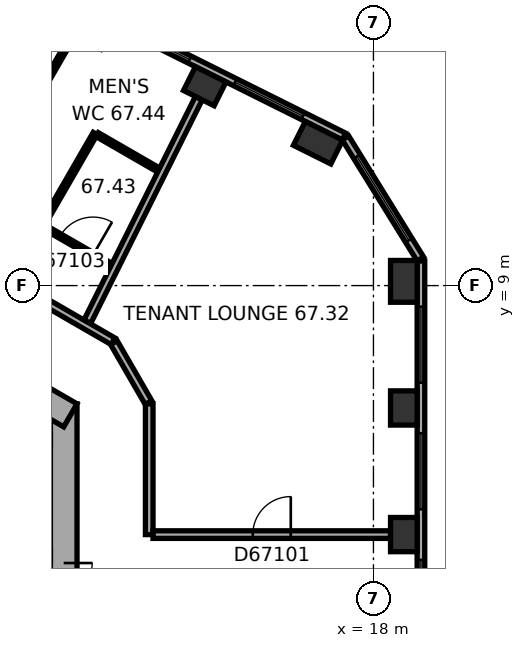
"""IFC4 building model, lengths in metres.
Left out: names, types, materials, properties, quantities, classifications, styles, units other than length and angle.
Written with IfcOpenShell. Run it as: python <this file> out.ifc"""

import sys

from ifc_helpers import new_model, si_unit, direction, frame, frame_2d, origin, origin_2d, place, context, subcontext, project, spatial, rectangle, extrude, element, fill, save


model = new_model("IFC4")
c1 = context("Model", 3, precision=1e-05, world=origin(), true_north=direction((0.0, 1.0)))
c2 = subcontext(c1, "Body", "Model", "MODEL_VIEW")
j1 = project(units=[si_unit("LENGTHUNIT", "METRE"), si_unit("PLANEANGLEUNIT", "RADIAN")], contexts=[c1])
p1 = place(None, origin())
s1 = spatial("IfcSite", under=j1, at=p1, CompositionType="ELEMENT")
p2 = place(p1, origin())
s2 = spatial("IfcBuilding", under=s1, at=p2, CompositionType="ELEMENT")
p3 = place(p2, frame((0.0, 0.0, 270.9)))
s3 = spatial("IfcBuildingStorey", under=s2, at=p3, CompositionType="ELEMENT", Elevation=270.9)
for number, where, z_axis, x_axis in (
    (1, (18.8, 2.448, 0.0), (0.0, 0.0, 1.0), (0.0, 1.0, 0.0)),
    (2, (18.8, 5.78, 0.0), (0.0, 0.0, 1.0), (0.0, 1.0, 0.0)),
):
    element("IfcColumn", number, at=place(p3, frame(where, z_axis=z_axis, x_axis=x_axis)), inside=s3, PredefinedType="COLUMN", context=c2, shape_type="SweptSolid", body=[
        extrude(rectangle(XDim=0.9, YDim=0.7, at=origin_2d()), origin(), (0.0, 0.0, 1.0), 3.7),
    ])
for number, where, z_axis, x_axis in (
    (3, (18.8, 9.112, 0.0), (0.0, 0.0, 1.0), (0.0, 1.0, 0.0)),
    (4, (16.543, 12.759, 0.0), (0.0, 0.0, 1.0), (-0.895, 0.446, 0.0)),
):
    element("IfcColumn", number, at=place(p3, frame(where, z_axis=z_axis, x_axis=x_axis)), inside=s3, PredefinedType="COLUMN", context=c2, shape_type="SweptSolid", body=[
        extrude(rectangle(XDim=1.1, YDim=0.7, at=origin_2d()), origin(), (0.0, 0.0, 1.0), 3.7),
    ])
p4 = place(p3, frame((13.561, 14.246, 0.0), z_axis=(0.0, 0.0, 1.0), x_axis=(-0.894934361602, 0.44619781311, 0.0)))
e5 = element("IfcColumn", 5, at=p4, inside=s3, PredefinedType="COLUMN", context=c2, shape_type="SweptSolid", body=[
    extrude(rectangle(XDim=0.9, YDim=0.7, at=origin_2d()), origin(), (0.0, 0.0, 1.0), 3.7),
])
p5 = place(p3, frame((9.85, -5.889, 0.0), z_axis=(0.0, 0.0, 1.0), x_axis=(0.0, 1.0, 0.0)))
e6 = element("IfcWall", 6, at=p5, inside=s3, PredefinedType="SHEAR", context=c2, shape_type="SweptSolid", body=[
    extrude(rectangle(XDim=11.778, YDim=0.7, at=frame_2d((5.889, 0.0))), origin(), (0.0, 0.0, 1.0), 3.7),
])
p6 = place(p5, frame((6.089, 0.0, 0.0)))
e7 = element("IfcOpeningElement", 7, at=p6, cuts=e6, PredefinedType="OPENING", context=c2, shape_type="SweptSolid", body=[
    extrude(rectangle(XDim=1.5, YDim=2.1, at=frame_2d((0.75, 1.05))), frame((0.0, 0.36, 0.0), z_axis=(0.0, -1.0, 0.0), x_axis=(1.0, 0.0, 0.0)), (0.0, 0.0, 1.0), 0.72),
])
p7 = place(p5, frame((1.639, 0.0, 0.0)))
e8 = element("IfcOpeningElement", 8, at=p7, cuts=e6, PredefinedType="OPENING", context=c2, shape_type="SweptSolid", body=[
    extrude(rectangle(XDim=0.9, YDim=2.1, at=frame_2d((0.45, 1.05))), frame((0.0, 0.36, 0.0), z_axis=(0.0, -1.0, 0.0), x_axis=(1.0, 0.0, 0.0)), (0.0, 0.0, 1.0), 0.72),
])
p8 = place(p5, frame((4.239, 0.0, 0.0)))
e9 = element("IfcOpeningElement", 9, at=p8, cuts=e6, PredefinedType="OPENING", context=c2, shape_type="SweptSolid", body=[
    extrude(rectangle(XDim=0.9, YDim=2.1, at=frame_2d((0.45, 1.05))), frame((0.0, 0.36, 0.0), z_axis=(0.0, -1.0, 0.0), x_axis=(1.0, 0.0, 0.0)), (0.0, 0.0, 1.0), 0.72),
])
p9 = place(p3, frame((10.025, 5.586, 0.0), z_axis=(0.0, 0.0, 1.0), x_axis=(-0.866026453023, 0.499998182661, 0.0)))
e10 = element("IfcWall", 10, at=p9, inside=s3, PredefinedType="SHEAR", context=c2, shape_type="SweptSolid", body=[
    extrude(rectangle(XDim=11.778, YDim=0.7, at=frame_2d((5.889, 0.0))), origin(), (0.0, 0.0, 1.0), 3.7),
])
p10 = place(p9, frame((5.139, 0.0, 0.0)))
e11 = element("IfcOpeningElement", 11, at=p10, cuts=e10, PredefinedType="OPENING", context=c2, shape_type="SweptSolid", body=[
    extrude(rectangle(XDim=0.9, YDim=2.1, at=frame_2d((0.45, 1.05))), frame((0.0, 0.36, 0.0), z_axis=(0.0, -1.0, 0.0), x_axis=(1.0, 0.0, 0.0)), (0.0, 0.0, 1.0), 0.72),
])
p11 = place(p3, frame((19.25, -8.084, 0.0), z_axis=(0.0, 0.0, 1.0), x_axis=(0.0, 1.0, 0.0)))
e12 = element("IfcWall", 12, at=p11, inside=s3, PredefinedType="STANDARD", context=c2, shape_type="SweptSolid", body=[
    extrude(rectangle(XDim=17.731, YDim=0.2, at=frame_2d((8.866, 0.0))), origin(), (0.0, 0.0, 1.0), 3.7),
])
p12 = place(p11, frame((1.203, 0.0, 0.9)))
e13 = element("IfcOpeningElement", 13, at=p12, cuts=e12, PredefinedType="OPENING", context=c2, shape_type="SweptSolid", body=[
    extrude(rectangle(XDim=2.0, YDim=2.0, at=frame_2d((1.0, 1.0))), frame((0.0, 0.11, 0.0), z_axis=(0.0, -1.0, 0.0), x_axis=(1.0, 0.0, 0.0)), (0.0, 0.0, 1.0), 0.22),
])
p13 = place(p11, frame((4.535, 0.0, 0.9)))
e14 = element("IfcOpeningElement", 14, at=p13, cuts=e12, PredefinedType="OPENING", context=c2, shape_type="SweptSolid", body=[
    extrude(rectangle(XDim=2.0, YDim=2.0, at=frame_2d((1.0, 1.0))), frame((0.0, 0.11, 0.0), z_axis=(0.0, -1.0, 0.0), x_axis=(1.0, 0.0, 0.0)), (0.0, 0.0, 1.0), 0.22),
])
p14 = place(p11, frame((7.866, 0.0, 0.9)))
e15 = element("IfcOpeningElement", 15, at=p14, cuts=e12, PredefinedType="OPENING", context=c2, shape_type="SweptSolid", body=[
    extrude(rectangle(XDim=2.0, YDim=2.0, at=frame_2d((1.0, 1.0))), frame((0.0, 0.11, 0.0), z_axis=(0.0, -1.0, 0.0), x_axis=(1.0, 0.0, 0.0)), (0.0, 0.0, 1.0), 0.22),
])
p15 = place(p11, frame((11.198, 0.0, 0.9)))
e16 = element("IfcOpeningElement", 16, at=p15, cuts=e12, PredefinedType="OPENING", context=c2, shape_type="SweptSolid", body=[
    extrude(rectangle(XDim=2.0, YDim=2.0, at=frame_2d((1.0, 1.0))), frame((0.0, 0.11, 0.0), z_axis=(0.0, -1.0, 0.0), x_axis=(1.0, 0.0, 0.0)), (0.0, 0.0, 1.0), 0.22),
])
p16 = place(p11, frame((14.53, 0.0, 0.9)))
e17 = element("IfcOpeningElement", 17, at=p16, cuts=e12, PredefinedType="OPENING", context=c2, shape_type="SweptSolid", body=[
    extrude(rectangle(XDim=2.0, YDim=2.0, at=frame_2d((1.0, 1.0))), frame((0.0, 0.11, 0.0), z_axis=(0.0, -1.0, 0.0), x_axis=(1.0, 0.0, 0.0)), (0.0, 0.0, 1.0), 0.22),
])
p17 = place(p3, frame((19.235, 9.7, 0.0), z_axis=(0.0, 0.0, 1.0), x_axis=(-0.526233475464, 0.850340125656, 0.0)))
e18 = element("IfcWall", 18, at=p17, inside=s3, PredefinedType="STANDARD", context=c2, shape_type="SweptSolid", body=[
    extrude(rectangle(XDim=3.747, YDim=0.2, at=frame_2d((1.874, 0.0))), origin(), (0.0, 0.0, 1.0), 3.7),
])
p18 = place(p17, frame((0.573, 0.0, 0.9)))
e19 = element("IfcOpeningElement", 19, at=p18, cuts=e18, PredefinedType="OPENING", context=c2, shape_type="SweptSolid", body=[
    extrude(rectangle(XDim=2.6, YDim=2.0, at=frame_2d((1.3, 1.0))), frame((0.0, 0.11, 0.0), z_axis=(0.0, -1.0, 0.0), x_axis=(1.0, 0.0, 0.0)), (0.0, 0.0, 1.0), 0.22),
])
p19 = place(p3, frame((17.223, 12.923, 0.0), z_axis=(0.0, 0.0, 1.0), x_axis=(-0.894930561148, 0.44620543556, 0.0)))
e20 = element("IfcWall", 20, at=p19, inside=s3, PredefinedType="STANDARD", context=c2, shape_type="SweptSolid", body=[
    extrude(rectangle(XDim=17.731, YDim=0.2, at=frame_2d((8.866, 0.0))), origin(), (0.0, 0.0, 1.0), 3.7),
])
p20 = place(p19, frame((1.202, 0.0, 0.9)))
e21 = element("IfcOpeningElement", 21, at=p20, cuts=e20, PredefinedType="OPENING", context=c2, shape_type="SweptSolid", body=[
    extrude(rectangle(XDim=2.0, YDim=2.0, at=frame_2d((1.0, 1.0))), frame((0.0, 0.11, 0.0), z_axis=(0.0, -1.0, 0.0), x_axis=(1.0, 0.0, 0.0)), (0.0, 0.0, 1.0), 0.22),
])
p21 = place(p19, frame((4.533, 0.0, 0.9)))
e22 = element("IfcOpeningElement", 22, at=p21, cuts=e20, PredefinedType="OPENING", context=c2, shape_type="SweptSolid", body=[
    extrude(rectangle(XDim=2.0, YDim=2.0, at=frame_2d((1.0, 1.0))), frame((0.0, 0.11, 0.0), z_axis=(0.0, -1.0, 0.0), x_axis=(1.0, 0.0, 0.0)), (0.0, 0.0, 1.0), 0.22),
])
p22 = place(p19, frame((7.865, 0.0, 0.9)))
e23 = element("IfcOpeningElement", 23, at=p22, cuts=e20, PredefinedType="OPENING", context=c2, shape_type="SweptSolid", body=[
    extrude(rectangle(XDim=2.0, YDim=2.0, at=frame_2d((1.0, 1.0))), frame((0.0, 0.11, 0.0), z_axis=(0.0, -1.0, 0.0), x_axis=(1.0, 0.0, 0.0)), (0.0, 0.0, 1.0), 0.22),
])
p23 = place(p19, frame((11.197, 0.0, 0.9)))
e24 = element("IfcOpeningElement", 24, at=p23, cuts=e20, PredefinedType="OPENING", context=c2, shape_type="SweptSolid", body=[
    extrude(rectangle(XDim=2.0, YDim=2.0, at=frame_2d((1.0, 1.0))), frame((0.0, 0.11, 0.0), z_axis=(0.0, -1.0, 0.0), x_axis=(1.0, 0.0, 0.0)), (0.0, 0.0, 1.0), 0.22),
])
p24 = place(p19, frame((14.528, 0.0, 0.9)))
e25 = element("IfcOpeningElement", 25, at=p24, cuts=e20, PredefinedType="OPENING", context=c2, shape_type="SweptSolid", body=[
    extrude(rectangle(XDim=2.0, YDim=2.0, at=frame_2d((1.0, 1.0))), frame((0.0, 0.11, 0.0), z_axis=(0.0, -1.0, 0.0), x_axis=(1.0, 0.0, 0.0)), (0.0, 0.0, 1.0), 0.22),
])
p25 = place(p3, frame((10.091, 15.585, 0.0), z_axis=(0.0, 0.0, 1.0), x_axis=(-0.499969186147, -0.86604319344, 0.0)))
e26 = element("IfcWall", 26, at=p25, inside=s3, PredefinedType="PARTITIONING", context=c2, shape_type="SweptSolid", body=[
    extrude(rectangle(XDim=4.682, YDim=0.12, at=frame_2d((2.341, 0.0))), origin(), (0.0, 0.0, 1.0), 2.87),
])
p26 = place(p3, frame((10.679, 13.003, 0.0), z_axis=(0.0, 0.0, 1.0), x_axis=(-0.500048966069, -0.865997131366, 0.0)))
e27 = element("IfcWall", 27, at=p26, inside=s3, PredefinedType="PARTITIONING", context=c2, shape_type="SweptSolid", body=[
    extrude(rectangle(XDim=2.74, YDim=0.12, at=frame_2d((1.37, 0.0))), origin(), (0.0, 0.0, 1.0), 3.42),
])
p27 = place(p3, frame((11.097, 9.528, 0.0), z_axis=(0.0, 0.0, 1.0), x_axis=(-0.866039938485, 0.499974824316, 0.0)))
e28 = element("IfcWall", 28, at=p27, inside=s3, PredefinedType="PARTITIONING", context=c2, shape_type="SweptSolid", body=[
    extrude(rectangle(XDim=6.476, YDim=0.12, at=frame_2d((3.238, 0.0))), origin(), (0.0, 0.0, 1.0), 3.42),
])
p28 = place(p27, frame((0.55, 0.0, 0.0)))
e29 = element("IfcOpeningElement", 29, at=p28, cuts=e28, PredefinedType="OPENING", context=c2, shape_type="SweptSolid", body=[
    extrude(rectangle(XDim=1.0, YDim=2.1, at=frame_2d((0.5, 1.05))), frame((0.0, 0.07, 0.0), z_axis=(0.0, -1.0, 0.0), x_axis=(1.0, 0.0, 0.0)), (0.0, 0.0, 1.0), 0.14),
])
p29 = place(p27, frame((2.55, 0.0, 0.0)))
e30 = element("IfcOpeningElement", 30, at=p29, cuts=e28, PredefinedType="OPENING", context=c2, shape_type="SweptSolid", body=[
    extrude(rectangle(XDim=0.9, YDim=2.1, at=frame_2d((0.45, 1.05))), frame((0.0, 0.07, 0.0), z_axis=(0.0, -1.0, 0.0), x_axis=(1.0, 0.0, 0.0)), (0.0, 0.0, 1.0), 0.14),
])
p30 = place(p27, frame((4.738, 0.0, 0.0)))
e31 = element("IfcOpeningElement", 31, at=p30, cuts=e28, PredefinedType="OPENING", context=c2, shape_type="SweptSolid", body=[
    extrude(rectangle(XDim=0.9, YDim=2.1, at=frame_2d((0.45, 1.05))), frame((0.0, 0.07, 0.0), z_axis=(0.0, -1.0, 0.0), x_axis=(1.0, 0.0, 0.0)), (0.0, 0.0, 1.0), 0.14),
])
p31 = place(p3, frame((11.15, 7.534, 0.0), z_axis=(0.0, 0.0, 1.0), x_axis=(-0.866026603062, 0.499997922785, 0.0)))
e32 = element("IfcWall", 32, at=p31, inside=s3, PredefinedType="PARTITIONING", context=c2, shape_type="SweptSolid", body=[
    extrude(rectangle(XDim=11.738, YDim=0.2, at=frame_2d((5.869, 0.0))), origin(), (0.0, 0.0, 1.0), 3.42),
])
p32 = place(p31, frame((3.676, 0.0, 0.0)))
e33 = element("IfcOpeningElement", 33, at=p32, cuts=e32, PredefinedType="OPENING", context=c2, shape_type="SweptSolid", body=[
    extrude(rectangle(XDim=1.0, YDim=2.1, at=frame_2d((0.5, 1.05))), frame((0.0, 0.11, 0.0), z_axis=(0.0, -1.0, 0.0), x_axis=(1.0, 0.0, 0.0)), (0.0, 0.0, 1.0), 0.22),
])
p33 = place(p3, frame((12.08, 5.924, 0.0), z_axis=(0.0, 0.0, 1.0), x_axis=(-0.500004960326, 0.86602253992, 0.0)))
e34 = element("IfcWall", 34, at=p33, inside=s3, PredefinedType="PARTITIONING", context=c2, shape_type="SweptSolid", body=[
    extrude(rectangle(XDim=1.82, YDim=0.2, at=frame_2d((0.91, 0.0))), origin(), (0.0, 0.0, 1.0), 3.42),
])
p34 = place(p3, frame((12.1, 2.448, 0.0), z_axis=(0.0, 0.0, 1.0), x_axis=(0.0, 1.0, 0.0)))
e35 = element("IfcWall", 35, at=p34, inside=s3, PredefinedType="PARTITIONING", context=c2, shape_type="SweptSolid", body=[
    extrude(rectangle(XDim=3.441, YDim=0.2, at=frame_2d((1.72, 0.0))), origin(), (0.0, 0.0, 1.0), 3.42),
])
p35 = place(p3, frame((12.349, 12.038, 0.0), z_axis=(0.0, 0.0, 1.0), x_axis=(-0.866039825209, 0.499975020527, 0.0)))
e36 = element("IfcWall", 36, at=p35, inside=s3, PredefinedType="PARTITIONING", context=c2, shape_type="SweptSolid", body=[
    extrude(rectangle(XDim=1.869, YDim=0.12, at=frame_2d((0.934, 0.0))), origin(), (0.0, 0.0, 1.0), 3.42),
])
p36 = place(p3, frame((13.405, 13.933, 0.0), z_axis=(0.0, 0.0, 1.0), x_axis=(-0.446187838644, -0.894939334618, 0.0)))
e37 = element("IfcWall", 37, at=p36, inside=s3, PredefinedType="PARTITIONING", context=c2, shape_type="SweptSolid", body=[
    extrude(rectangle(XDim=6.571, YDim=0.2, at=frame_2d((3.286, 0.0))), origin(), (0.0, 0.0, 1.0), 3.42),
])
p37 = place(p3, frame((18.45, 2.448, 0.0), z_axis=(0.0, 0.0, 1.0), x_axis=(-1.0, 0.0, 0.0)))
e38 = element("IfcWall", 38, at=p37, inside=s3, PredefinedType="PARTITIONING", context=c2, shape_type="SweptSolid", body=[
    extrude(rectangle(XDim=6.25, YDim=0.2, at=frame_2d((3.125, 0.0))), origin(), (0.0, 0.0, 1.0), 3.42),
])
p38 = place(p37, frame((2.625, 0.0, 0.0)))
e39 = element("IfcOpeningElement", 39, at=p38, cuts=e38, PredefinedType="OPENING", context=c2, shape_type="SweptSolid", body=[
    extrude(rectangle(XDim=1.0, YDim=2.1, at=frame_2d((0.5, 1.05))), frame((0.0, 0.11, 0.0), z_axis=(0.0, -1.0, 0.0), x_axis=(1.0, 0.0, 0.0)), (0.0, 0.0, 1.0), 0.22),
])
p39 = place(p14, origin())
e40 = element("IfcWindow", 40, at=p39, inside=s3, PartitioningType="SINGLE_PANEL", PredefinedType="WINDOW", context=c2, shape_type="SweptSolid", body=[
    extrude(rectangle(XDim=2.0, YDim=2.0, at=frame_2d((1.0, 1.0))), frame((0.0, 0.03, 0.0), z_axis=(0.0, -1.0, 0.0), x_axis=(1.0, 0.0, 0.0)), (0.0, 0.0, 1.0), 0.06),
])
fill(e15, e40)
p40 = place(p15, origin())
e41 = element("IfcWindow", 41, at=p40, inside=s3, PartitioningType="SINGLE_PANEL", PredefinedType="WINDOW", context=c2, shape_type="SweptSolid", body=[
    extrude(rectangle(XDim=2.0, YDim=2.0, at=frame_2d((1.0, 1.0))), frame((0.0, 0.03, 0.0), z_axis=(0.0, -1.0, 0.0), x_axis=(1.0, 0.0, 0.0)), (0.0, 0.0, 1.0), 0.06),
])
fill(e16, e41)
p41 = place(p16, origin())
e42 = element("IfcWindow", 42, at=p41, inside=s3, PartitioningType="SINGLE_PANEL", PredefinedType="WINDOW", context=c2, shape_type="SweptSolid", body=[
    extrude(rectangle(XDim=2.0, YDim=2.0, at=frame_2d((1.0, 1.0))), frame((0.0, 0.03, 0.0), z_axis=(0.0, -1.0, 0.0), x_axis=(1.0, 0.0, 0.0)), (0.0, 0.0, 1.0), 0.06),
])
fill(e17, e42)
p42 = place(p18, origin())
e43 = element("IfcWindow", 43, at=p42, inside=s3, PartitioningType="SINGLE_PANEL", PredefinedType="WINDOW", context=c2, shape_type="SweptSolid", body=[
    extrude(rectangle(XDim=2.6, YDim=2.0, at=frame_2d((1.3, 1.0))), frame((0.0, 0.03, 0.0), z_axis=(0.0, -1.0, 0.0), x_axis=(1.0, 0.0, 0.0)), (0.0, 0.0, 1.0), 0.06),
])
fill(e19, e43)
p43 = place(p20, origin())
e44 = element("IfcWindow", 44, at=p43, inside=s3, PartitioningType="SINGLE_PANEL", PredefinedType="WINDOW", context=c2, shape_type="SweptSolid", body=[
    extrude(rectangle(XDim=2.0, YDim=2.0, at=frame_2d((1.0, 1.0))), frame((0.0, 0.03, 0.0), z_axis=(0.0, -1.0, 0.0), x_axis=(1.0, 0.0, 0.0)), (0.0, 0.0, 1.0), 0.06),
])
fill(e21, e44)
p44 = place(p21, origin())
e45 = element("IfcWindow", 45, at=p44, inside=s3, PartitioningType="SINGLE_PANEL", PredefinedType="WINDOW", context=c2, shape_type="SweptSolid", body=[
    extrude(rectangle(XDim=2.0, YDim=2.0, at=frame_2d((1.0, 1.0))), frame((0.0, 0.03, 0.0), z_axis=(0.0, -1.0, 0.0), x_axis=(1.0, 0.0, 0.0)), (0.0, 0.0, 1.0), 0.06),
])
fill(e22, e45)
p45 = place(p6, origin())
e46 = element("IfcDoor", 46, at=p45, inside=s3, OperationType="DOUBLE_DOOR_SINGLE_SWING", PredefinedType="DOOR", context=c2, shape_type="SweptSolid", body=[
    extrude(rectangle(XDim=1.5, YDim=2.1, at=frame_2d((0.75, 1.05))), frame((0.0, 0.025, 0.0), z_axis=(0.0, -1.0, 0.0), x_axis=(1.0, 0.0, 0.0)), (0.0, 0.0, 1.0), 0.05),
])
fill(e7, e46)
p46 = place(p38, origin())
e47 = element("IfcDoor", 47, at=p46, inside=s3, OperationType="SINGLE_SWING_LEFT", PredefinedType="DOOR", context=c2, shape_type="SweptSolid", body=[
    extrude(rectangle(XDim=1.0, YDim=2.1, at=frame_2d((0.5, 1.05))), frame((0.0, 0.025, 0.0), z_axis=(0.0, -1.0, 0.0), x_axis=(1.0, 0.0, 0.0)), (0.0, 0.0, 1.0), 0.05),
])
fill(e39, e47)
p47 = place(p28, origin())
e48 = element("IfcDoor", 48, at=p47, inside=s3, OperationType="SINGLE_SWING_LEFT", PredefinedType="DOOR", context=c2, shape_type="SweptSolid", body=[
    extrude(rectangle(XDim=1.0, YDim=2.1, at=frame_2d((0.5, 1.05))), frame((0.0, 0.025, 0.0), z_axis=(0.0, -1.0, 0.0), x_axis=(1.0, 0.0, 0.0)), (0.0, 0.0, 1.0), 0.05),
])
fill(e29, e48)
save(model, sys.argv[1])
